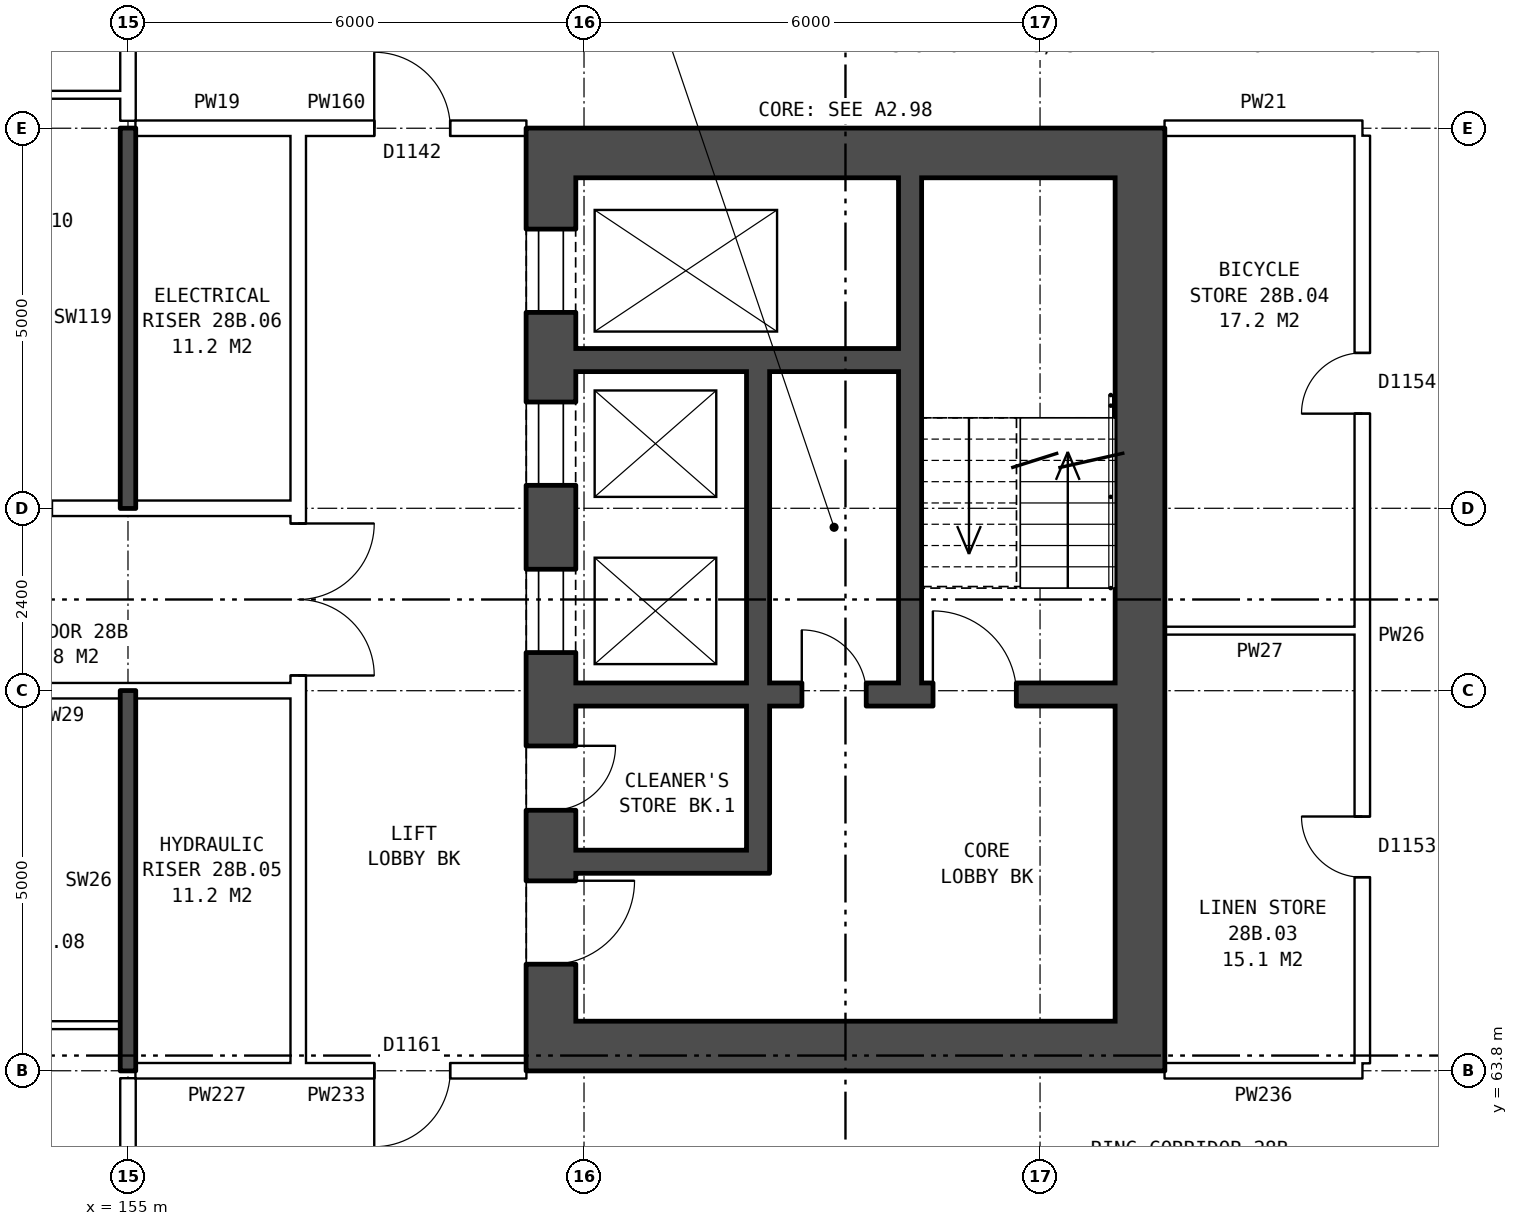
"""IFC4 building model, lengths in metres.
Left out: names, types, materials, properties, quantities, classifications, styles, units other than length and angle.
Written with IfcOpenShell. Run it as: python <this file> out.ifc"""

import sys

from ifc_helpers import new_model, si_unit, direction, frame, frame_2d, origin, place, context, subcontext, project, spatial, rectangle, extrude, element, fill, save


model = new_model("IFC4")
c1 = context("Model", 3, precision=1e-05, world=origin(), true_north=direction((0.0, 1.0)))
c2 = subcontext(c1, "Body", "Model", "MODEL_VIEW")
j1 = project(units=[si_unit("LENGTHUNIT", "METRE"), si_unit("PLANEANGLEUNIT", "RADIAN")], contexts=[c1])
p1 = place(None, origin())
s1 = spatial("IfcSite", under=j1, at=p1, CompositionType="ELEMENT")
p2 = place(p1, origin())
s2 = spatial("IfcBuilding", under=s1, at=p2, CompositionType="ELEMENT")
p3 = place(p2, frame((0.0, 0.0, 102.6)))
s3 = spatial("IfcBuildingStorey", under=s2, at=p3, CompositionType="ELEMENT", Elevation=102.6)
p4 = place(p3, frame((160.565, 75.55, 0.0), z_axis=(0.0, 0.0, 1.0), x_axis=(0.0, -1.0, 0.0)))
e1 = element("IfcWall", 1, at=p4, inside=s3, PredefinedType="SHEAR", context=c2, shape_type="SweptSolid", body=[
    extrude(rectangle(XDim=11.1, YDim=0.65, at=frame_2d((5.55, 0.0))), origin(), (0.0, 0.0, 1.0), 2.85),
])
p5 = place(p4, frame((0.675, 0.0, 0.0)))
e2 = element("IfcOpeningElement", 2, at=p5, cuts=e1, PredefinedType="OPENING", context=c2, shape_type="SweptSolid", body=[
    extrude(rectangle(XDim=1.1, YDim=2.1, at=frame_2d((0.55, 1.05))), frame((0.0, 0.335, 0.0), z_axis=(0.0, -1.0, 0.0), x_axis=(1.0, 0.0, 0.0)), (0.0, 0.0, 1.0), 0.67),
])
p6 = place(p4, frame((2.95, 0.0, 0.0)))
e3 = element("IfcOpeningElement", 3, at=p6, cuts=e1, PredefinedType="OPENING", context=c2, shape_type="SweptSolid", body=[
    extrude(rectangle(XDim=1.1, YDim=2.1, at=frame_2d((0.55, 1.05))), frame((0.0, 0.335, 0.0), z_axis=(0.0, -1.0, 0.0), x_axis=(1.0, 0.0, 0.0)), (0.0, 0.0, 1.0), 0.67),
])
p7 = place(p4, frame((5.15, 0.0, 0.0)))
e4 = element("IfcOpeningElement", 4, at=p7, cuts=e1, PredefinedType="OPENING", context=c2, shape_type="SweptSolid", body=[
    extrude(rectangle(XDim=1.1, YDim=2.1, at=frame_2d((0.55, 1.05))), frame((0.0, 0.335, 0.0), z_axis=(0.0, -1.0, 0.0), x_axis=(1.0, 0.0, 0.0)), (0.0, 0.0, 1.0), 0.67),
])
p8 = place(p4, frame((9.25, 0.0, 0.0)))
e5 = element("IfcOpeningElement", 5, at=p8, cuts=e1, PredefinedType="OPENING", context=c2, shape_type="SweptSolid", body=[
    extrude(rectangle(XDim=1.1, YDim=2.1, at=frame_2d((0.55, 1.05))), frame((0.0, 0.335, 0.0), z_axis=(0.0, -1.0, 0.0), x_axis=(1.0, 0.0, 0.0)), (0.0, 0.0, 1.0), 0.67),
])
p9 = place(p4, frame((7.475, 0.0, 0.0)))
e6 = element("IfcOpeningElement", 6, at=p9, cuts=e1, PredefinedType="OPENING", context=c2, shape_type="SweptSolid", body=[
    extrude(rectangle(XDim=0.85, YDim=2.1, at=frame_2d((0.425, 1.05))), frame((0.0, 0.335, 0.0), z_axis=(0.0, -1.0, 0.0), x_axis=(1.0, 0.0, 0.0)), (0.0, 0.0, 1.0), 0.67),
])
p10 = place(p3, frame((168.315, 75.55, 0.0), z_axis=(0.0, 0.0, 1.0), x_axis=(0.0, -1.0, 0.0)))
e7 = element("IfcWall", 7, at=p10, inside=s3, PredefinedType="SHEAR", context=c2, shape_type="SweptSolid", body=[
    extrude(rectangle(XDim=11.1, YDim=0.65, at=frame_2d((5.55, 0.0))), origin(), (0.0, 0.0, 1.0), 2.85),
])
for number, where, z_axis, x_axis in (
    (8, (160.24, 75.875, 0.0), (0.0, 0.0, 1.0), (1.0, 0.0, 0.0)),
    (9, (160.24, 64.125, 0.0), (0.0, 0.0, 1.0), (1.0, 0.0, 0.0)),
):
    element("IfcWall", number, at=place(p3, frame(where, z_axis=z_axis, x_axis=x_axis)), inside=s3, PredefinedType="SHEAR", context=c2, shape_type="SweptSolid", body=[
        extrude(rectangle(XDim=8.4, YDim=0.65, at=frame_2d((4.2, 0.0))), origin(), (0.0, 0.0, 1.0), 2.85),
    ])
p11 = place(p3, frame((160.89, 73.15, 0.0), z_axis=(0.0, 0.0, 1.0), x_axis=(1.0, 0.0, 0.0)))
e10 = element("IfcWall", 10, at=p11, inside=s3, PredefinedType="SHEAR", context=c2, shape_type="SweptSolid", body=[
    extrude(rectangle(XDim=4.25, YDim=0.3, at=frame_2d((2.125, 0.0))), origin(), (0.0, 0.0, 1.0), 2.85),
])
p12 = place(p3, frame((160.89, 68.75, 0.0), z_axis=(0.0, 0.0, 1.0), x_axis=(1.0, 0.0, 0.0)))
e11 = element("IfcWall", 11, at=p12, inside=s3, PredefinedType="SHEAR", context=c2, shape_type="SweptSolid", body=[
    extrude(rectangle(XDim=7.1, YDim=0.3, at=frame_2d((3.55, 0.0))), origin(), (0.0, 0.0, 1.0), 2.85),
])
p13 = place(p12, frame((4.7, 0.0, 0.0)))
e12 = element("IfcOpeningElement", 12, at=p13, cuts=e11, PredefinedType="OPENING", context=c2, shape_type="SweptSolid", body=[
    extrude(rectangle(XDim=1.1, YDim=2.1, at=frame_2d((0.55, 1.05))), frame((0.0, 0.16, 0.0), z_axis=(0.0, -1.0, 0.0), x_axis=(1.0, 0.0, 0.0)), (0.0, 0.0, 1.0), 0.32),
])
p14 = place(p12, frame((2.975, 0.0, 0.0)))
e13 = element("IfcOpeningElement", 13, at=p14, cuts=e11, PredefinedType="OPENING", context=c2, shape_type="SweptSolid", body=[
    extrude(rectangle(XDim=0.85, YDim=2.1, at=frame_2d((0.425, 1.05))), frame((0.0, 0.16, 0.0), z_axis=(0.0, -1.0, 0.0), x_axis=(1.0, 0.0, 0.0)), (0.0, 0.0, 1.0), 0.32),
])
p15 = place(p3, frame((160.89, 66.55, 0.0), z_axis=(0.0, 0.0, 1.0), x_axis=(1.0, 0.0, 0.0)))
e14 = element("IfcWall", 14, at=p15, inside=s3, PredefinedType="SHEAR", context=c2, shape_type="SweptSolid", body=[
    extrude(rectangle(XDim=2.25, YDim=0.3, at=frame_2d((1.125, 0.0))), origin(), (0.0, 0.0, 1.0), 2.85),
])
p16 = place(p3, frame((163.29, 73.0, 0.0), z_axis=(0.0, 0.0, 1.0), x_axis=(0.0, -1.0, 0.0)))
e15 = element("IfcWall", 15, at=p16, inside=s3, PredefinedType="SHEAR", context=c2, shape_type="SweptSolid", body=[
    extrude(rectangle(XDim=4.1, YDim=0.3, at=frame_2d((2.05, 0.0))), origin(), (0.0, 0.0, 1.0), 2.85),
])
p17 = place(p3, frame((163.29, 68.6, 0.0), z_axis=(0.0, 0.0, 1.0), x_axis=(0.0, -1.0, 0.0)))
e16 = element("IfcWall", 16, at=p17, inside=s3, PredefinedType="SHEAR", context=c2, shape_type="SweptSolid", body=[
    extrude(rectangle(XDim=2.2, YDim=0.3, at=frame_2d((1.1, 0.0))), origin(), (0.0, 0.0, 1.0), 2.85),
])
p18 = place(p3, frame((165.29, 75.55, 0.0), z_axis=(0.0, 0.0, 1.0), x_axis=(0.0, -1.0, 0.0)))
e17 = element("IfcWall", 17, at=p18, inside=s3, PredefinedType="SHEAR", context=c2, shape_type="SweptSolid", body=[
    extrude(rectangle(XDim=6.65, YDim=0.3, at=frame_2d((3.325, 0.0))), origin(), (0.0, 0.0, 1.0), 2.85),
])
p19 = place(p3, frame((157.24, 63.9, 0.0), z_axis=(0.0, 0.0, 1.0), x_axis=(0.0, 1.0, 0.0)))
e18 = element("IfcWall", 18, at=p19, inside=s3, PredefinedType="PARTITIONING", context=c2, shape_type="SweptSolid", body=[
    extrude(rectangle(XDim=12.2, YDim=0.2, at=frame_2d((6.1, 0.0))), origin(), (0.0, 0.0, 1.0), 2.85),
])
p20 = place(p19, frame((5.1, 0.0, 0.0)))
e19 = element("IfcOpeningElement", 19, at=p20, cuts=e18, PredefinedType="OPENING", context=c2, shape_type="SweptSolid", body=[
    extrude(rectangle(XDim=2.0, YDim=2.1, at=frame_2d((1.0, 1.05))), frame((0.0, 0.11, 0.0), z_axis=(0.0, -1.0, 0.0), x_axis=(1.0, 0.0, 0.0)), (0.0, 0.0, 1.0), 0.22),
])
p21 = place(p3, frame((155.1, 63.8, 0.0), z_axis=(0.0, 0.0, 1.0), x_axis=(1.0, 0.0, 0.0)))
e20 = element("IfcWall", 20, at=p21, inside=s3, PredefinedType="PARTITIONING", context=c2, shape_type="SweptSolid", body=[
    extrude(rectangle(XDim=2.14, YDim=0.2, at=frame_2d((1.07, 0.0))), origin(), (0.0, 0.0, 1.0), 2.85),
])
p22 = place(p3, frame((157.24, 63.8, 0.0), z_axis=(0.0, 0.0, 1.0), x_axis=(1.0, 0.0, 0.0)))
e21 = element("IfcWall", 21, at=p22, inside=s3, PredefinedType="PARTITIONING", context=c2, shape_type="SweptSolid", body=[
    extrude(rectangle(XDim=3.0, YDim=0.2, at=frame_2d((1.5, 0.0))), origin(), (0.0, 0.0, 1.0), 2.85),
])
p23 = place(p22, frame((1.0, 0.0, 0.0)))
e22 = element("IfcOpeningElement", 22, at=p23, cuts=e21, PredefinedType="OPENING", context=c2, shape_type="SweptSolid", body=[
    extrude(rectangle(XDim=1.0, YDim=2.1, at=frame_2d((0.5, 1.05))), frame((0.0, 0.11, 0.0), z_axis=(0.0, -1.0, 0.0), x_axis=(1.0, 0.0, 0.0)), (0.0, 0.0, 1.0), 0.22),
])
p24 = place(p3, frame((168.64, 63.8, 0.0), z_axis=(0.0, 0.0, 1.0), x_axis=(1.0, 0.0, 0.0)))
e23 = element("IfcWall", 23, at=p24, inside=s3, PredefinedType="PARTITIONING", context=c2, shape_type="SweptSolid", body=[
    extrude(rectangle(XDim=2.6, YDim=0.2, at=frame_2d((1.3, 0.0))), origin(), (0.0, 0.0, 1.0), 2.85),
])
p25 = place(p3, frame((152.0, 64.4, 0.0), z_axis=(0.0, 0.0, 1.0), x_axis=(1.0, 0.0, 0.0)))
e24 = element("IfcWall", 24, at=p25, inside=s3, PredefinedType="PARTITIONING", context=c2, shape_type="SweptSolid", body=[
    extrude(rectangle(XDim=2.9, YDim=0.1, at=frame_2d((1.45, 0.0))), origin(), (0.0, 0.0, 1.0), 2.85),
])
p26 = place(p3, frame((142.76, 68.8, 0.0), z_axis=(0.0, 0.0, 1.0), x_axis=(1.0, 0.0, 0.0)))
e25 = element("IfcWall", 25, at=p26, inside=s3, PredefinedType="PARTITIONING", context=c2, shape_type="SweptSolid", body=[
    extrude(rectangle(XDim=14.48, YDim=0.2, at=frame_2d((7.24, 0.0))), origin(), (0.0, 0.0, 1.0), 2.85),
])
p27 = place(p26, frame((4.24, 0.0, 0.0)))
e26 = element("IfcOpeningElement", 26, at=p27, cuts=e25, PredefinedType="OPENING", context=c2, shape_type="SweptSolid", body=[
    extrude(rectangle(XDim=1.0, YDim=2.1, at=frame_2d((0.5, 1.05))), frame((0.0, 0.11, 0.0), z_axis=(0.0, -1.0, 0.0), x_axis=(1.0, 0.0, 0.0)), (0.0, 0.0, 1.0), 0.22),
])
p28 = place(p26, frame((7.24, 0.0, 0.0)))
e27 = element("IfcOpeningElement", 27, at=p28, cuts=e25, PredefinedType="OPENING", context=c2, shape_type="SweptSolid", body=[
    extrude(rectangle(XDim=1.0, YDim=2.1, at=frame_2d((0.5, 1.05))), frame((0.0, 0.11, 0.0), z_axis=(0.0, -1.0, 0.0), x_axis=(1.0, 0.0, 0.0)), (0.0, 0.0, 1.0), 0.22),
])
p29 = place(p3, frame((168.64, 69.59, 0.0), z_axis=(0.0, 0.0, 1.0), x_axis=(1.0, 0.0, 0.0)))
e28 = element("IfcWall", 28, at=p29, inside=s3, PredefinedType="PARTITIONING", context=c2, shape_type="SweptSolid", body=[
    extrude(rectangle(XDim=2.5, YDim=0.1, at=frame_2d((1.25, 0.0))), origin(), (0.0, 0.0, 1.0), 2.85),
])
p30 = place(p3, frame((142.76, 71.2, 0.0), z_axis=(0.0, 0.0, 1.0), x_axis=(1.0, 0.0, 0.0)))
e29 = element("IfcWall", 29, at=p30, inside=s3, PredefinedType="PARTITIONING", context=c2, shape_type="SweptSolid", body=[
    extrude(rectangle(XDim=14.48, YDim=0.2, at=frame_2d((7.24, 0.0))), origin(), (0.0, 0.0, 1.0), 2.85),
])
p31 = place(p30, frame((1.12, 0.0, 0.0)))
e30 = element("IfcOpeningElement", 30, at=p31, cuts=e29, PredefinedType="OPENING", context=c2, shape_type="SweptSolid", body=[
    extrude(rectangle(XDim=1.0, YDim=2.1, at=frame_2d((0.5, 1.05))), frame((0.0, 0.11, 0.0), z_axis=(0.0, -1.0, 0.0), x_axis=(1.0, 0.0, 0.0)), (0.0, 0.0, 1.0), 0.22),
])
p32 = place(p30, frame((10.24, 0.0, 0.0)))
e31 = element("IfcOpeningElement", 31, at=p32, cuts=e29, PredefinedType="OPENING", context=c2, shape_type="SweptSolid", body=[
    extrude(rectangle(XDim=1.0, YDim=2.1, at=frame_2d((0.5, 1.05))), frame((0.0, 0.11, 0.0), z_axis=(0.0, -1.0, 0.0), x_axis=(1.0, 0.0, 0.0)), (0.0, 0.0, 1.0), 0.22),
])
p33 = place(p3, frame((155.1, 76.2, 0.0), z_axis=(0.0, 0.0, 1.0), x_axis=(1.0, 0.0, 0.0)))
e32 = element("IfcWall", 32, at=p33, inside=s3, PredefinedType="PARTITIONING", context=c2, shape_type="SweptSolid", body=[
    extrude(rectangle(XDim=2.14, YDim=0.2, at=frame_2d((1.07, 0.0))), origin(), (0.0, 0.0, 1.0), 2.85),
])
p34 = place(p3, frame((157.24, 76.2, 0.0), z_axis=(0.0, 0.0, 1.0), x_axis=(1.0, 0.0, 0.0)))
e33 = element("IfcWall", 33, at=p34, inside=s3, PredefinedType="PARTITIONING", context=c2, shape_type="SweptSolid", body=[
    extrude(rectangle(XDim=3.0, YDim=0.2, at=frame_2d((1.5, 0.0))), origin(), (0.0, 0.0, 1.0), 2.85),
])
p35 = place(p34, frame((1.0, 0.0, 0.0)))
e34 = element("IfcOpeningElement", 34, at=p35, cuts=e33, PredefinedType="OPENING", context=c2, shape_type="SweptSolid", body=[
    extrude(rectangle(XDim=1.0, YDim=2.1, at=frame_2d((0.5, 1.05))), frame((0.0, 0.11, 0.0), z_axis=(0.0, -1.0, 0.0), x_axis=(1.0, 0.0, 0.0)), (0.0, 0.0, 1.0), 0.22),
])
p36 = place(p3, frame((168.64, 76.2, 0.0), z_axis=(0.0, 0.0, 1.0), x_axis=(1.0, 0.0, 0.0)))
e35 = element("IfcWall", 35, at=p36, inside=s3, PredefinedType="PARTITIONING", context=c2, shape_type="SweptSolid", body=[
    extrude(rectangle(XDim=2.6, YDim=0.2, at=frame_2d((1.3, 0.0))), origin(), (0.0, 0.0, 1.0), 2.85),
])
p37 = place(p3, frame((152.0, 76.64, 0.0), z_axis=(0.0, 0.0, 1.0), x_axis=(1.0, 0.0, 0.0)))
e36 = element("IfcWall", 36, at=p37, inside=s3, PredefinedType="PARTITIONING", context=c2, shape_type="SweptSolid", body=[
    extrude(rectangle(XDim=2.9, YDim=0.1, at=frame_2d((1.45, 0.0))), origin(), (0.0, 0.0, 1.0), 2.85),
])
p38 = place(p37, frame((1.0, 0.0, 0.0)))
e37 = element("IfcOpeningElement", 37, at=p38, cuts=e36, PredefinedType="OPENING", context=c2, shape_type="SweptSolid", body=[
    extrude(rectangle(XDim=0.9, YDim=2.1, at=frame_2d((0.45, 1.05))), frame((0.0, 0.06, 0.0), z_axis=(0.0, -1.0, 0.0), x_axis=(1.0, 0.0, 0.0)), (0.0, 0.0, 1.0), 0.12),
])
p39 = place(p3, frame((155.0, 61.5, 0.0), z_axis=(0.0, 0.0, 1.0), x_axis=(0.0, 1.0, 0.0)))
e38 = element("IfcWall", 38, at=p39, inside=s3, PredefinedType="PARTITIONING", context=c2, shape_type="SweptSolid", body=[
    extrude(rectangle(XDim=2.2, YDim=0.2, at=frame_2d((1.1, 0.0))), origin(), (0.0, 0.0, 1.0), 2.85),
])
for number, where, z_axis, x_axis in (
    (39, (155.0, 63.8, 0.0), (0.0, 0.0, 1.0), (0.0, 1.0, 0.0)),
    (40, (155.0, 71.2, 0.0), (0.0, 0.0, 1.0), (0.0, 1.0, 0.0)),
):
    element("IfcWall", number, at=place(p3, frame(where, z_axis=z_axis, x_axis=x_axis)), inside=s3, PredefinedType="SOLIDWALL", context=c2, shape_type="SweptSolid", body=[
        extrude(rectangle(XDim=5.0, YDim=0.2, at=frame_2d((2.5, 0.0))), origin(), (0.0, 0.0, 1.0), 2.85),
    ])
p40 = place(p3, frame((155.0, 76.3, 0.0), z_axis=(0.0, 0.0, 1.0), x_axis=(0.0, 1.0, 0.0)))
e41 = element("IfcWall", 41, at=p40, inside=s3, PredefinedType="PARTITIONING", context=c2, shape_type="SweptSolid", body=[
    extrude(rectangle(XDim=2.2, YDim=0.2, at=frame_2d((1.1, 0.0))), origin(), (0.0, 0.0, 1.0), 2.85),
])
p41 = place(p3, frame((171.24, 63.9, 0.0), z_axis=(0.0, 0.0, 1.0), x_axis=(0.0, 1.0, 0.0)))
e42 = element("IfcWall", 42, at=p41, inside=s3, PredefinedType="PARTITIONING", context=c2, shape_type="SweptSolid", body=[
    extrude(rectangle(XDim=12.2, YDim=0.2, at=frame_2d((6.1, 0.0))), origin(), (0.0, 0.0, 1.0), 2.85),
])
p42 = place(p41, frame((2.445, 0.0, 0.0)))
e43 = element("IfcOpeningElement", 43, at=p42, cuts=e42, PredefinedType="OPENING", context=c2, shape_type="SweptSolid", body=[
    extrude(rectangle(XDim=0.8, YDim=2.1, at=frame_2d((0.4, 1.05))), frame((0.0, 0.11, 0.0), z_axis=(0.0, -1.0, 0.0), x_axis=(1.0, 0.0, 0.0)), (0.0, 0.0, 1.0), 0.22),
])
p43 = place(p41, frame((8.545, 0.0, 0.0)))
e44 = element("IfcOpeningElement", 44, at=p43, cuts=e42, PredefinedType="OPENING", context=c2, shape_type="SweptSolid", body=[
    extrude(rectangle(XDim=0.8, YDim=2.1, at=frame_2d((0.4, 1.05))), frame((0.0, 0.11, 0.0), z_axis=(0.0, -1.0, 0.0), x_axis=(1.0, 0.0, 0.0)), (0.0, 0.0, 1.0), 0.22),
])
p44 = place(p5, origin())
e45 = element("IfcDoor", 45, at=p44, inside=s3, OperationType="DOUBLE_DOOR_SLIDING", PredefinedType="DOOR", context=c2, shape_type="SweptSolid", body=[
    extrude(rectangle(XDim=1.1, YDim=2.1, at=frame_2d((0.55, 1.05))), frame((0.0, 0.31, 0.0), z_axis=(0.0, -1.0, 0.0), x_axis=(1.0, 0.0, 0.0)), (0.0, 0.0, 1.0), 0.05),
])
fill(e2, e45)
p45 = place(p6, origin())
e46 = element("IfcDoor", 46, at=p45, inside=s3, OperationType="DOUBLE_DOOR_SLIDING", PredefinedType="DOOR", context=c2, shape_type="SweptSolid", body=[
    extrude(rectangle(XDim=1.1, YDim=2.1, at=frame_2d((0.55, 1.05))), frame((0.0, 0.31, 0.0), z_axis=(0.0, -1.0, 0.0), x_axis=(1.0, 0.0, 0.0)), (0.0, 0.0, 1.0), 0.05),
])
fill(e3, e46)
p46 = place(p7, origin())
e47 = element("IfcDoor", 47, at=p46, inside=s3, OperationType="DOUBLE_DOOR_SLIDING", PredefinedType="DOOR", context=c2, shape_type="SweptSolid", body=[
    extrude(rectangle(XDim=1.1, YDim=2.1, at=frame_2d((0.55, 1.05))), frame((0.0, 0.31, 0.0), z_axis=(0.0, -1.0, 0.0), x_axis=(1.0, 0.0, 0.0)), (0.0, 0.0, 1.0), 0.05),
])
fill(e4, e47)
p47 = place(p8, origin())
e48 = element("IfcDoor", 48, at=p47, inside=s3, OperationType="SINGLE_SWING_LEFT", PredefinedType="DOOR", context=c2, shape_type="SweptSolid", body=[
    extrude(rectangle(XDim=1.1, YDim=2.1, at=frame_2d((0.55, 1.05))), frame((0.0, 0.31, 0.0), z_axis=(0.0, -1.0, 0.0), x_axis=(1.0, 0.0, 0.0)), (0.0, 0.0, 1.0), 0.05),
])
fill(e5, e48)
p48 = place(p13, origin())
e49 = element("IfcDoor", 49, at=p48, inside=s3, OperationType="SINGLE_SWING_LEFT", PredefinedType="DOOR", context=c2, shape_type="SweptSolid", body=[
    extrude(rectangle(XDim=1.1, YDim=2.1, at=frame_2d((0.55, 1.05))), frame((0.0, 0.025, 0.0), z_axis=(0.0, -1.0, 0.0), x_axis=(1.0, 0.0, 0.0)), (0.0, 0.0, 1.0), 0.05),
])
fill(e12, e49)
p49 = place(p9, origin())
e50 = element("IfcDoor", 50, at=p49, inside=s3, OperationType="SINGLE_SWING_LEFT", PredefinedType="DOOR", context=c2, shape_type="SweptSolid", body=[
    extrude(rectangle(XDim=0.85, YDim=2.1, at=frame_2d((0.425, 1.05))), frame((0.0, 0.31, 0.0), z_axis=(0.0, -1.0, 0.0), x_axis=(1.0, 0.0, 0.0)), (0.0, 0.0, 1.0), 0.05),
])
fill(e6, e50)
p50 = place(p14, origin())
e51 = element("IfcDoor", 51, at=p50, inside=s3, OperationType="SINGLE_SWING_LEFT", PredefinedType="DOOR", context=c2, shape_type="SweptSolid", body=[
    extrude(rectangle(XDim=0.85, YDim=2.1, at=frame_2d((0.425, 1.05))), frame((0.0, 0.025, 0.0), z_axis=(0.0, -1.0, 0.0), x_axis=(1.0, 0.0, 0.0)), (0.0, 0.0, 1.0), 0.05),
])
fill(e13, e51)
p51 = place(p20, frame((2.0, 0.0, 0.0), z_axis=(0.0, 0.0, 1.0), x_axis=(-1.0, 0.0, 0.0)))
e52 = element("IfcDoor", 52, at=p51, inside=s3, OperationType="DOUBLE_DOOR_SINGLE_SWING", PredefinedType="DOOR", context=c2, shape_type="SweptSolid", body=[
    extrude(rectangle(XDim=2.0, YDim=2.1, at=frame_2d((1.0, 1.05))), frame((0.0, 0.025, 0.0), z_axis=(0.0, -1.0, 0.0), x_axis=(1.0, 0.0, 0.0)), (0.0, 0.0, 1.0), 0.05),
])
fill(e19, e52)
p52 = place(p23, frame((1.0, 0.0, 0.0), z_axis=(0.0, 0.0, 1.0), x_axis=(-1.0, 0.0, 0.0)))
e53 = element("IfcDoor", 53, at=p52, inside=s3, OperationType="SINGLE_SWING_RIGHT", PredefinedType="DOOR", context=c2, shape_type="SweptSolid", body=[
    extrude(rectangle(XDim=1.0, YDim=2.1, at=frame_2d((0.5, 1.05))), frame((0.0, 0.025, 0.0), z_axis=(0.0, -1.0, 0.0), x_axis=(1.0, 0.0, 0.0)), (0.0, 0.0, 1.0), 0.05),
])
fill(e22, e53)
p53 = place(p35, origin())
e54 = element("IfcDoor", 54, at=p53, inside=s3, OperationType="SINGLE_SWING_LEFT", PredefinedType="DOOR", context=c2, shape_type="SweptSolid", body=[
    extrude(rectangle(XDim=1.0, YDim=2.1, at=frame_2d((0.5, 1.05))), frame((0.0, 0.025, 0.0), z_axis=(0.0, -1.0, 0.0), x_axis=(1.0, 0.0, 0.0)), (0.0, 0.0, 1.0), 0.05),
])
fill(e34, e54)
p54 = place(p42, origin())
e55 = element("IfcDoor", 55, at=p54, inside=s3, OperationType="SINGLE_SWING_RIGHT", PredefinedType="DOOR", context=c2, shape_type="SweptSolid", body=[
    extrude(rectangle(XDim=0.8, YDim=2.1, at=frame_2d((0.4, 1.05))), frame((0.0, 0.025, 0.0), z_axis=(0.0, -1.0, 0.0), x_axis=(1.0, 0.0, 0.0)), (0.0, 0.0, 1.0), 0.05),
])
fill(e43, e55)
p55 = place(p43, origin())
e56 = element("IfcDoor", 56, at=p55, inside=s3, OperationType="SINGLE_SWING_LEFT", PredefinedType="DOOR", context=c2, shape_type="SweptSolid", body=[
    extrude(rectangle(XDim=0.8, YDim=2.1, at=frame_2d((0.4, 1.05))), frame((0.0, 0.025, 0.0), z_axis=(0.0, -1.0, 0.0), x_axis=(1.0, 0.0, 0.0)), (0.0, 0.0, 1.0), 0.05),
])
fill(e44, e56)
save(model, sys.argv[1])
